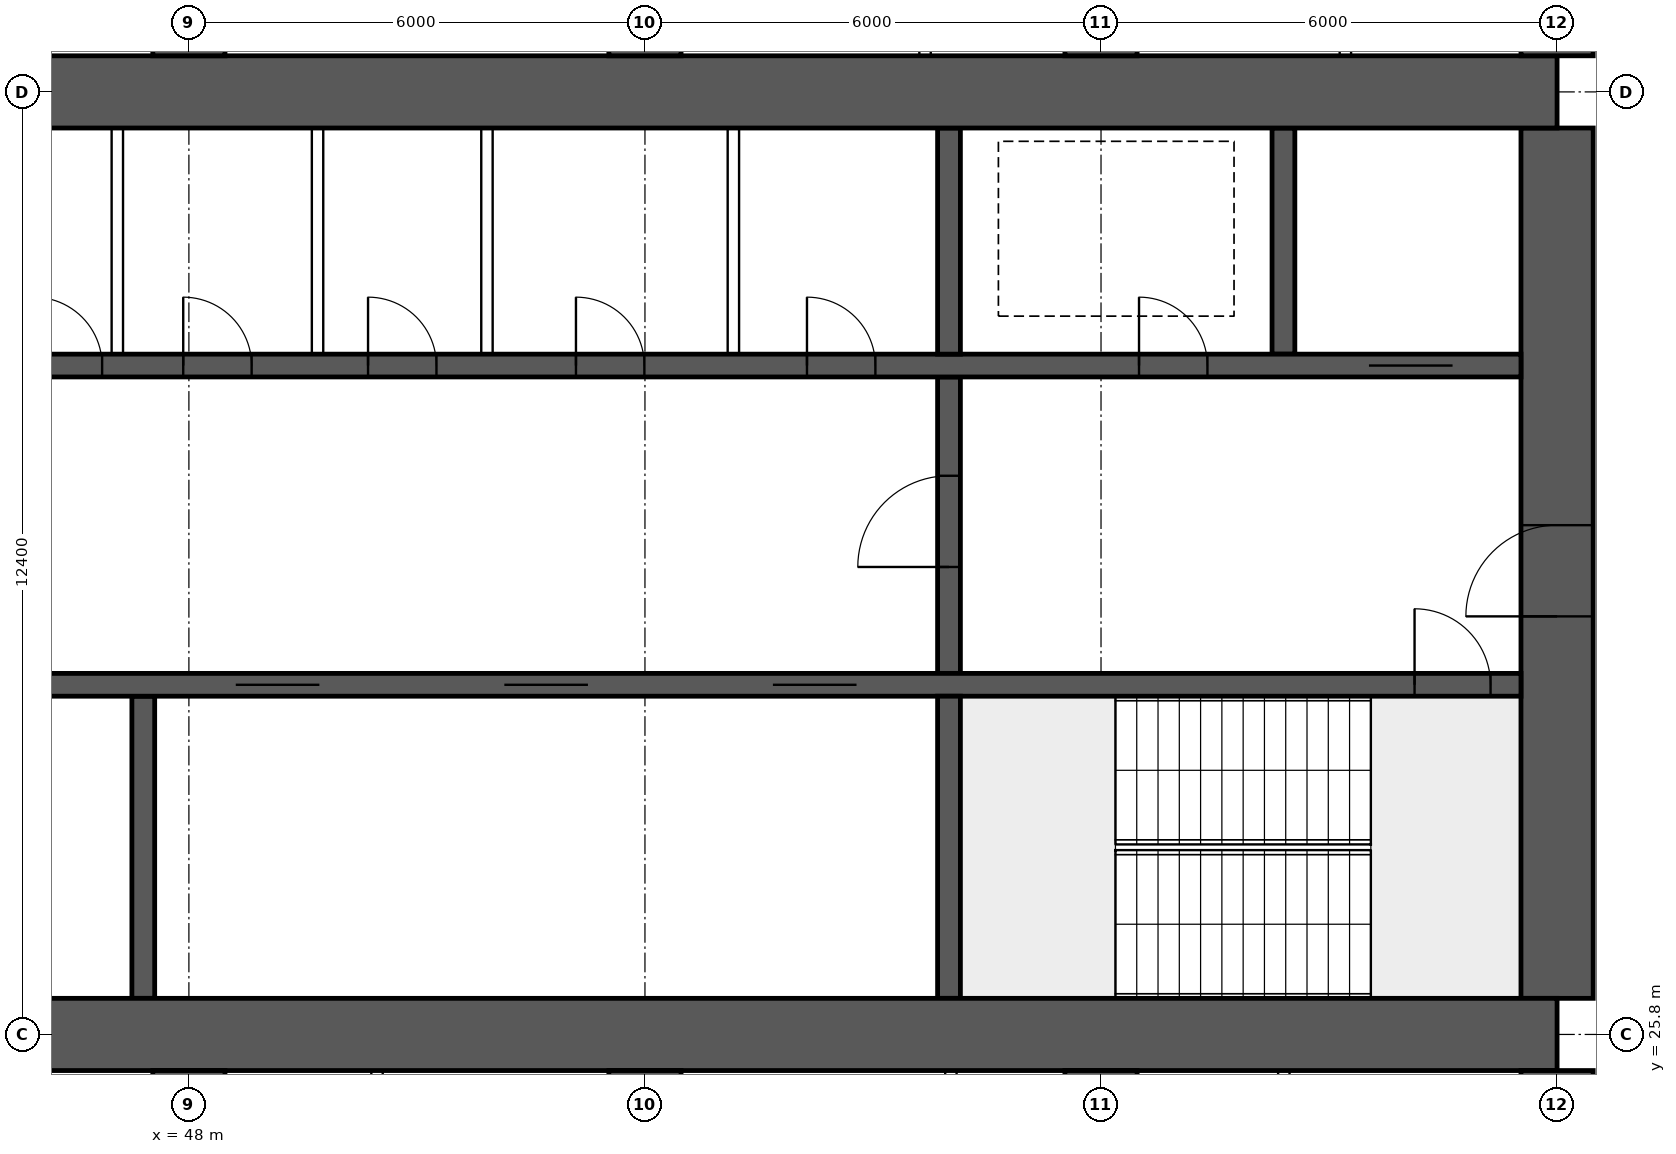
"""IFC4 building model, lengths in metres.
Left out: names, types, materials, properties, quantities, classifications, styles, units other than length and angle.
Written with IfcOpenShell. Run it as: python <this file> out.ifc"""

import sys

from ifc_helpers import new_model, si_unit, direction, frame, frame_2d, origin, place, context, subcontext, project, spatial, rectangle, extrude, element, fill, save


model = new_model("IFC4")
c1 = context("Model", 3, precision=1e-05, world=origin(), true_north=direction((0.0, 1.0)))
c2 = subcontext(c1, "Body", "Model", "MODEL_VIEW")
j1 = project(units=[si_unit("LENGTHUNIT", "METRE"), si_unit("PLANEANGLEUNIT", "RADIAN")], contexts=[c1])
p1 = place(None, origin())
s1 = spatial("IfcSite", under=j1, at=p1, CompositionType="ELEMENT")
p2 = place(p1, origin())
s2 = spatial("IfcBuilding", under=s1, at=p2, CompositionType="ELEMENT")
p3 = place(p2, frame((0.0, 0.0, 76.15)))
s3 = spatial("IfcBuildingStorey", under=s2, at=p3, CompositionType="ELEMENT", Elevation=76.15)
for number, where, z_axis, x_axis in (
    (1, (18.0, 25.8, 0.0), (0.0, 0.0, 1.0), (1.0, 0.0, 0.0)),
    (2, (18.0, 38.2, 0.0), (0.0, 0.0, 1.0), (1.0, 0.0, 0.0)),
):
    element("IfcWall", number, at=place(p3, frame(where, z_axis=z_axis, x_axis=x_axis)), inside=s3, PredefinedType="SHEAR", context=c2, shape_type="SweptSolid", body=[
        extrude(rectangle(XDim=48.0, YDim=0.95, at=frame_2d((24.0, 0.0))), origin(), (0.0, 0.0, 1.0), 4.5),
    ])
p4 = place(p3, frame((66.0, 26.275, 0.0), z_axis=(0.0, 0.0, 1.0), x_axis=(0.0, 1.0, 0.0)))
e3 = element("IfcWall", 3, at=p4, inside=s3, PredefinedType="SHEAR", context=c2, shape_type="SweptSolid", body=[
    extrude(rectangle(XDim=11.45, YDim=0.95, at=frame_2d((5.725, 0.0))), origin(), (0.0, 0.0, 1.0), 4.5),
])
p5 = place(p4, frame((5.025, 0.0, 0.0)))
e4 = element("IfcOpeningElement", 4, at=p5, cuts=e3, PredefinedType="OPENING", context=c2, shape_type="SweptSolid", body=[
    extrude(rectangle(XDim=1.2, YDim=2.1, at=frame_2d((0.6, 1.05))), frame((0.0, 0.485, 0.0), z_axis=(0.0, -1.0, 0.0), x_axis=(1.0, 0.0, 0.0)), (0.0, 0.0, 1.0), 0.97),
])
p6 = place(p3, frame((18.475, 30.4, 0.0), z_axis=(0.0, 0.0, 1.0), x_axis=(1.0, 0.0, 0.0)))
e5 = element("IfcWall", 5, at=p6, inside=s3, PredefinedType="SHEAR", context=c2, shape_type="SweptSolid", body=[
    extrude(rectangle(XDim=47.05, YDim=0.3, at=frame_2d((23.525, 0.0))), origin(), (0.0, 0.0, 1.0), 4.5),
])
p7 = place(p6, frame((0.4, 0.0, 0.0)))
e6 = element("IfcOpeningElement", 6, at=p7, cuts=e5, PredefinedType="OPENING", context=c2, shape_type="SweptSolid", body=[
    extrude(rectangle(XDim=1.0, YDim=2.1, at=frame_2d((0.5, 1.05))), frame((0.0, 0.16, 0.0), z_axis=(0.0, -1.0, 0.0), x_axis=(1.0, 0.0, 0.0)), (0.0, 0.0, 1.0), 0.32),
])
p8 = place(p6, frame((45.65, 0.0, 0.0)))
e7 = element("IfcOpeningElement", 7, at=p8, cuts=e5, PredefinedType="OPENING", context=c2, shape_type="SweptSolid", body=[
    extrude(rectangle(XDim=1.0, YDim=2.1, at=frame_2d((0.5, 1.05))), frame((0.0, 0.16, 0.0), z_axis=(0.0, -1.0, 0.0), x_axis=(1.0, 0.0, 0.0)), (0.0, 0.0, 1.0), 0.32),
])
p9 = place(p6, frame((8.275, 0.0, 0.0)))
e8 = element("IfcOpeningElement", 8, at=p9, cuts=e5, PredefinedType="OPENING", context=c2, shape_type="SweptSolid", body=[
    extrude(rectangle(XDim=1.1, YDim=2.1, at=frame_2d((0.55, 1.05))), frame((0.0, 0.16, 0.0), z_axis=(0.0, -1.0, 0.0), x_axis=(1.0, 0.0, 0.0)), (0.0, 0.0, 1.0), 0.32),
])
p10 = place(p6, frame((10.875, 0.0, 0.0)))
e9 = element("IfcOpeningElement", 9, at=p10, cuts=e5, PredefinedType="OPENING", context=c2, shape_type="SweptSolid", body=[
    extrude(rectangle(XDim=1.1, YDim=2.1, at=frame_2d((0.55, 1.05))), frame((0.0, 0.16, 0.0), z_axis=(0.0, -1.0, 0.0), x_axis=(1.0, 0.0, 0.0)), (0.0, 0.0, 1.0), 0.32),
])
p11 = place(p6, frame((13.475, 0.0, 0.0)))
e10 = element("IfcOpeningElement", 10, at=p11, cuts=e5, PredefinedType="OPENING", context=c2, shape_type="SweptSolid", body=[
    extrude(rectangle(XDim=1.1, YDim=2.1, at=frame_2d((0.55, 1.05))), frame((0.0, 0.16, 0.0), z_axis=(0.0, -1.0, 0.0), x_axis=(1.0, 0.0, 0.0)), (0.0, 0.0, 1.0), 0.32),
])
p12 = place(p6, frame((16.075, 0.0, 0.0)))
e11 = element("IfcOpeningElement", 11, at=p12, cuts=e5, PredefinedType="OPENING", context=c2, shape_type="SweptSolid", body=[
    extrude(rectangle(XDim=1.1, YDim=2.1, at=frame_2d((0.55, 1.05))), frame((0.0, 0.16, 0.0), z_axis=(0.0, -1.0, 0.0), x_axis=(1.0, 0.0, 0.0)), (0.0, 0.0, 1.0), 0.32),
])
p13 = place(p6, frame((18.75, 0.0, 0.0)))
e12 = element("IfcOpeningElement", 12, at=p13, cuts=e5, PredefinedType="OPENING", context=c2, shape_type="SweptSolid", body=[
    extrude(rectangle(XDim=1.1, YDim=2.1, at=frame_2d((0.55, 1.05))), frame((0.0, 0.16, 0.0), z_axis=(0.0, -1.0, 0.0), x_axis=(1.0, 0.0, 0.0)), (0.0, 0.0, 1.0), 0.32),
])
p14 = place(p6, frame((30.142, 0.0, 0.0)))
e13 = element("IfcOpeningElement", 13, at=p14, cuts=e5, PredefinedType="OPENING", context=c2, shape_type="SweptSolid", body=[
    extrude(rectangle(XDim=1.1, YDim=2.1, at=frame_2d((0.55, 1.05))), frame((0.0, 0.16, 0.0), z_axis=(0.0, -1.0, 0.0), x_axis=(1.0, 0.0, 0.0)), (0.0, 0.0, 1.0), 0.32),
])
p15 = place(p6, frame((33.675, 0.0, 0.0)))
e14 = element("IfcOpeningElement", 14, at=p15, cuts=e5, PredefinedType="OPENING", context=c2, shape_type="SweptSolid", body=[
    extrude(rectangle(XDim=1.1, YDim=2.1, at=frame_2d((0.55, 1.05))), frame((0.0, 0.16, 0.0), z_axis=(0.0, -1.0, 0.0), x_axis=(1.0, 0.0, 0.0)), (0.0, 0.0, 1.0), 0.32),
])
p16 = place(p6, frame((37.208, 0.0, 0.0)))
e15 = element("IfcOpeningElement", 15, at=p16, cuts=e5, PredefinedType="OPENING", context=c2, shape_type="SweptSolid", body=[
    extrude(rectangle(XDim=1.1, YDim=2.1, at=frame_2d((0.55, 1.05))), frame((0.0, 0.16, 0.0), z_axis=(0.0, -1.0, 0.0), x_axis=(1.0, 0.0, 0.0)), (0.0, 0.0, 1.0), 0.32),
])
p17 = place(p3, frame((18.475, 34.6, 0.0), z_axis=(0.0, 0.0, 1.0), x_axis=(1.0, 0.0, 0.0)))
e16 = element("IfcWall", 16, at=p17, inside=s3, PredefinedType="SHEAR", context=c2, shape_type="SweptSolid", body=[
    extrude(rectangle(XDim=47.05, YDim=0.3, at=frame_2d((23.525, 0.0))), origin(), (0.0, 0.0, 1.0), 4.5),
])
p18 = place(p17, frame((0.9, 0.0, 0.0)))
e17 = element("IfcOpeningElement", 17, at=p18, cuts=e16, PredefinedType="OPENING", context=c2, shape_type="SweptSolid", body=[
    extrude(rectangle(XDim=1.1, YDim=2.1, at=frame_2d((0.55, 1.05))), frame((0.0, 0.16, 0.0), z_axis=(0.0, -1.0, 0.0), x_axis=(1.0, 0.0, 0.0)), (0.0, 0.0, 1.0), 0.32),
])
p19 = place(p17, frame((45.05, 0.0, 0.0)))
e18 = element("IfcOpeningElement", 18, at=p19, cuts=e16, PredefinedType="OPENING", context=c2, shape_type="SweptSolid", body=[
    extrude(rectangle(XDim=1.1, YDim=2.1, at=frame_2d((0.55, 1.05))), frame((0.0, 0.16, 0.0), z_axis=(0.0, -1.0, 0.0), x_axis=(1.0, 0.0, 0.0)), (0.0, 0.0, 1.0), 0.32),
])
p20 = place(p17, frame((4.125, 0.0, 0.0)))
e19 = element("IfcOpeningElement", 19, at=p20, cuts=e16, PredefinedType="OPENING", context=c2, shape_type="SweptSolid", body=[
    extrude(rectangle(XDim=0.9, YDim=2.1, at=frame_2d((0.45, 1.05))), frame((0.0, 0.16, 0.0), z_axis=(0.0, -1.0, 0.0), x_axis=(1.0, 0.0, 0.0)), (0.0, 0.0, 1.0), 0.32),
])
p21 = place(p17, frame((42.025, 0.0, 0.0)))
e20 = element("IfcOpeningElement", 20, at=p21, cuts=e16, PredefinedType="OPENING", context=c2, shape_type="SweptSolid", body=[
    extrude(rectangle(XDim=0.9, YDim=2.1, at=frame_2d((0.45, 1.05))), frame((0.0, 0.16, 0.0), z_axis=(0.0, -1.0, 0.0), x_axis=(1.0, 0.0, 0.0)), (0.0, 0.0, 1.0), 0.32),
])
p22 = place(p17, frame((8.9, 0.0, 0.0)))
e21 = element("IfcOpeningElement", 21, at=p22, cuts=e16, PredefinedType="OPENING", context=c2, shape_type="SweptSolid", body=[
    extrude(rectangle(XDim=0.9, YDim=2.1, at=frame_2d((0.45, 1.05))), frame((0.0, 0.16, 0.0), z_axis=(0.0, -1.0, 0.0), x_axis=(1.0, 0.0, 0.0)), (0.0, 0.0, 1.0), 0.32),
])
p23 = place(p17, frame((12.874, 0.0, 0.0)))
e22 = element("IfcOpeningElement", 22, at=p23, cuts=e16, PredefinedType="OPENING", context=c2, shape_type="SweptSolid", body=[
    extrude(rectangle(XDim=0.9, YDim=2.1, at=frame_2d((0.45, 1.05))), frame((0.0, 0.16, 0.0), z_axis=(0.0, -1.0, 0.0), x_axis=(1.0, 0.0, 0.0)), (0.0, 0.0, 1.0), 0.32),
])
p24 = place(p17, frame((16.521, 0.0, 0.0)))
e23 = element("IfcOpeningElement", 23, at=p24, cuts=e16, PredefinedType="OPENING", context=c2, shape_type="SweptSolid", body=[
    extrude(rectangle(XDim=0.9, YDim=2.1, at=frame_2d((0.45, 1.05))), frame((0.0, 0.16, 0.0), z_axis=(0.0, -1.0, 0.0), x_axis=(1.0, 0.0, 0.0)), (0.0, 0.0, 1.0), 0.32),
])
p25 = place(p17, frame((20.28, 0.0, 0.0)))
e24 = element("IfcOpeningElement", 24, at=p25, cuts=e16, PredefinedType="OPENING", context=c2, shape_type="SweptSolid", body=[
    extrude(rectangle(XDim=0.9, YDim=2.1, at=frame_2d((0.45, 1.05))), frame((0.0, 0.16, 0.0), z_axis=(0.0, -1.0, 0.0), x_axis=(1.0, 0.0, 0.0)), (0.0, 0.0, 1.0), 0.32),
])
p26 = place(p17, frame((24.686, 0.0, 0.0)))
e25 = element("IfcOpeningElement", 25, at=p26, cuts=e16, PredefinedType="OPENING", context=c2, shape_type="SweptSolid", body=[
    extrude(rectangle(XDim=0.9, YDim=2.1, at=frame_2d((0.45, 1.05))), frame((0.0, 0.16, 0.0), z_axis=(0.0, -1.0, 0.0), x_axis=(1.0, 0.0, 0.0)), (0.0, 0.0, 1.0), 0.32),
])
p27 = place(p17, frame((27.483, 0.0, 0.0)))
e26 = element("IfcOpeningElement", 26, at=p27, cuts=e16, PredefinedType="OPENING", context=c2, shape_type="SweptSolid", body=[
    extrude(rectangle(XDim=0.9, YDim=2.1, at=frame_2d((0.45, 1.05))), frame((0.0, 0.16, 0.0), z_axis=(0.0, -1.0, 0.0), x_axis=(1.0, 0.0, 0.0)), (0.0, 0.0, 1.0), 0.32),
])
p28 = place(p17, frame((29.45, 0.0, 0.0)))
e27 = element("IfcOpeningElement", 27, at=p28, cuts=e16, PredefinedType="OPENING", context=c2, shape_type="SweptSolid", body=[
    extrude(rectangle(XDim=0.9, YDim=2.1, at=frame_2d((0.45, 1.05))), frame((0.0, 0.16, 0.0), z_axis=(0.0, -1.0, 0.0), x_axis=(1.0, 0.0, 0.0)), (0.0, 0.0, 1.0), 0.32),
])
p29 = place(p17, frame((31.882, 0.0, 0.0)))
e28 = element("IfcOpeningElement", 28, at=p29, cuts=e16, PredefinedType="OPENING", context=c2, shape_type="SweptSolid", body=[
    extrude(rectangle(XDim=0.9, YDim=2.1, at=frame_2d((0.45, 1.05))), frame((0.0, 0.16, 0.0), z_axis=(0.0, -1.0, 0.0), x_axis=(1.0, 0.0, 0.0)), (0.0, 0.0, 1.0), 0.32),
])
p30 = place(p17, frame((34.617, 0.0, 0.0)))
e29 = element("IfcOpeningElement", 29, at=p30, cuts=e16, PredefinedType="OPENING", context=c2, shape_type="SweptSolid", body=[
    extrude(rectangle(XDim=0.9, YDim=2.1, at=frame_2d((0.45, 1.05))), frame((0.0, 0.16, 0.0), z_axis=(0.0, -1.0, 0.0), x_axis=(1.0, 0.0, 0.0)), (0.0, 0.0, 1.0), 0.32),
])
p31 = place(p17, frame((37.656, 0.0, 0.0)))
e30 = element("IfcOpeningElement", 30, at=p31, cuts=e16, PredefinedType="OPENING", context=c2, shape_type="SweptSolid", body=[
    extrude(rectangle(XDim=0.9, YDim=2.1, at=frame_2d((0.45, 1.05))), frame((0.0, 0.16, 0.0), z_axis=(0.0, -1.0, 0.0), x_axis=(1.0, 0.0, 0.0)), (0.0, 0.0, 1.0), 0.32),
])
p32 = place(p3, frame((58.0, 26.275, 0.0), z_axis=(0.0, 0.0, 1.0), x_axis=(0.0, 1.0, 0.0)))
e31 = element("IfcWall", 31, at=p32, inside=s3, PredefinedType="SHEAR", context=c2, shape_type="SweptSolid", body=[
    extrude(rectangle(XDim=3.975, YDim=0.3, at=frame_2d((1.988, 0.0))), origin(), (0.0, 0.0, 1.0), 4.5),
])
p33 = place(p3, frame((58.0, 30.55, 0.0), z_axis=(0.0, 0.0, 1.0), x_axis=(0.0, 1.0, 0.0)))
e32 = element("IfcWall", 32, at=p33, inside=s3, PredefinedType="SHEAR", context=c2, shape_type="SweptSolid", body=[
    extrude(rectangle(XDim=3.9, YDim=0.3, at=frame_2d((1.95, 0.0))), origin(), (0.0, 0.0, 1.0), 4.5),
])
p34 = place(p33, frame((1.4, 0.0, 0.0)))
e33 = element("IfcOpeningElement", 33, at=p34, cuts=e32, PredefinedType="OPENING", context=c2, shape_type="SweptSolid", body=[
    extrude(rectangle(XDim=1.2, YDim=2.1, at=frame_2d((0.6, 1.05))), frame((0.0, 0.16, 0.0), z_axis=(0.0, -1.0, 0.0), x_axis=(1.0, 0.0, 0.0)), (0.0, 0.0, 1.0), 0.32),
])
for number, where, z_axis, x_axis in (
    (34, (62.4, 34.75, 0.0), (0.0, 0.0, 1.0), (0.0, 1.0, 0.0)),
    (35, (58.0, 34.75, 0.0), (0.0, 0.0, 1.0), (0.0, 1.0, 0.0)),
):
    element("IfcWall", number, at=place(p3, frame(where, z_axis=z_axis, x_axis=x_axis)), inside=s3, PredefinedType="SHEAR", context=c2, shape_type="SweptSolid", body=[
        extrude(rectangle(XDim=2.975, YDim=0.3, at=frame_2d((1.488, 0.0))), origin(), (0.0, 0.0, 1.0), 4.5),
    ])
p35 = place(p3, frame((47.4, 26.275, 0.0), z_axis=(0.0, 0.0, 1.0), x_axis=(0.0, 1.0, 0.0)))
e36 = element("IfcWall", 36, at=p35, inside=s3, PredefinedType="SHEAR", context=c2, shape_type="SweptSolid", body=[
    extrude(rectangle(XDim=3.975, YDim=0.3, at=frame_2d((1.988, 0.0))), origin(), (0.0, 0.0, 1.0), 4.5),
])
for number, where, z_axis, x_axis in (
    (37, (48.0, 16.0, 0.0), (0.0, 0.0, 1.0), (0.0, 1.0, 0.0)),
    (38, (48.0, 38.675, 0.0), (0.0, 0.0, 1.0), (0.0, 1.0, 0.0)),
    (39, (54.0, 16.0, 0.0), (0.0, 0.0, 1.0), (0.0, 1.0, 0.0)),
    (40, (54.0, 38.675, 0.0), (0.0, 0.0, 1.0), (0.0, 1.0, 0.0)),
    (41, (60.0, 16.0, 0.0), (0.0, 0.0, 1.0), (0.0, 1.0, 0.0)),
    (42, (60.0, 38.675, 0.0), (0.0, 0.0, 1.0), (0.0, 1.0, 0.0)),
    (43, (66.0, 16.0, 0.0), (0.0, 0.0, 1.0), (0.0, 1.0, 0.0)),
    (44, (66.0, 38.675, 0.0), (0.0, 0.0, 1.0), (0.0, 1.0, 0.0)),
):
    element("IfcWall", number, at=place(p3, frame(where, z_axis=z_axis, x_axis=x_axis)), inside=s3, PredefinedType="SHEAR", context=c2, shape_type="SweptSolid", body=[
        extrude(rectangle(XDim=9.325, YDim=0.95, at=frame_2d((4.663, 0.0))), origin(), (0.0, 0.0, 1.0), 4.5),
    ])
for number, where, z_axis, x_axis in (
    (45, (47.058, 34.75, 0.0), (0.0, 0.0, 1.0), (0.0, 1.0, 0.0)),
    (46, (49.692, 34.75, 0.0), (0.0, 0.0, 1.0), (0.0, 1.0, 0.0)),
    (47, (51.921, 34.75, 0.0), (0.0, 0.0, 1.0), (0.0, 1.0, 0.0)),
    (48, (55.163, 34.75, 0.0), (0.0, 0.0, 1.0), (0.0, 1.0, 0.0)),
):
    element("IfcWall", number, at=place(p3, frame(where, z_axis=z_axis, x_axis=x_axis)), inside=s3, PredefinedType="SOLIDWALL", context=c2, shape_type="SweptSolid", body=[
        extrude(rectangle(XDim=2.975, YDim=0.15, at=frame_2d((1.488, 0.0))), origin(), (0.0, 0.0, 1.0), 4.25),
    ])
for number, where, z_axis, x_axis in (
    (49, (50.475, 16.1, 0.0), (0.0, 0.0, 1.0), (0.0, 1.0, 0.0)),
    (50, (58.025, 16.1, 0.0), (0.0, 0.0, 1.0), (0.0, 1.0, 0.0)),
    (51, (62.405, 16.1, 0.0), (0.0, 0.0, 1.0), (0.0, 1.0, 0.0)),
    (52, (57.685, 38.675, 0.0), (0.0, 0.0, 1.0), (0.0, 1.0, 0.0)),
    (53, (63.215, 38.675, 0.0), (0.0, 0.0, 1.0), (0.0, 1.0, 0.0)),
):
    element("IfcWall", number, at=place(p3, frame(where, z_axis=z_axis, x_axis=x_axis)), inside=s3, PredefinedType="PARTITIONING", context=c2, shape_type="SweptSolid", body=[
        extrude(rectangle(XDim=9.225, YDim=0.15, at=frame_2d((4.612, 0.0))), origin(), (0.0, 0.0, 1.0), 4.25),
    ])
p36 = place(p5, origin())
e54 = element("IfcDoor", 54, at=p36, inside=s3, OperationType="SINGLE_SWING_LEFT", PredefinedType="DOOR", context=c2, shape_type="SweptSolid", body=[
    extrude(rectangle(XDim=1.2, YDim=2.1, at=frame_2d((0.6, 1.05))), frame((0.0, 0.025, 0.0), z_axis=(0.0, -1.0, 0.0), x_axis=(1.0, 0.0, 0.0)), (0.0, 0.0, 1.0), 0.05),
])
fill(e4, e54)
p37 = place(p8, origin())
e55 = element("IfcDoor", 55, at=p37, inside=s3, OperationType="SINGLE_SWING_LEFT", PredefinedType="DOOR", context=c2, shape_type="SweptSolid", body=[
    extrude(rectangle(XDim=1.0, YDim=2.1, at=frame_2d((0.5, 1.05))), frame((0.0, 0.025, 0.0), z_axis=(0.0, -1.0, 0.0), x_axis=(1.0, 0.0, 0.0)), (0.0, 0.0, 1.0), 0.05),
])
fill(e7, e55)
p38 = place(p19, origin())
e56 = element("IfcDoor", 56, at=p38, inside=s3, OperationType="DOUBLE_DOOR_SLIDING", PredefinedType="DOOR", context=c2, shape_type="SweptSolid", body=[
    extrude(rectangle(XDim=1.1, YDim=2.1, at=frame_2d((0.55, 1.05))), frame((0.0, 0.025, 0.0), z_axis=(0.0, -1.0, 0.0), x_axis=(1.0, 0.0, 0.0)), (0.0, 0.0, 1.0), 0.05),
])
fill(e18, e56)
p39 = place(p21, origin())
e57 = element("IfcDoor", 57, at=p39, inside=s3, OperationType="SINGLE_SWING_LEFT", PredefinedType="DOOR", context=c2, shape_type="SweptSolid", body=[
    extrude(rectangle(XDim=0.9, YDim=2.1, at=frame_2d((0.45, 1.05))), frame((0.0, 0.025, 0.0), z_axis=(0.0, -1.0, 0.0), x_axis=(1.0, 0.0, 0.0)), (0.0, 0.0, 1.0), 0.05),
])
fill(e20, e57)
p40 = place(p34, origin())
e58 = element("IfcDoor", 58, at=p40, inside=s3, OperationType="SINGLE_SWING_LEFT", PredefinedType="DOOR", context=c2, shape_type="SweptSolid", body=[
    extrude(rectangle(XDim=1.2, YDim=2.1, at=frame_2d((0.6, 1.05))), frame((0.0, 0.025, 0.0), z_axis=(0.0, -1.0, 0.0), x_axis=(1.0, 0.0, 0.0)), (0.0, 0.0, 1.0), 0.05),
])
fill(e33, e58)
p41 = place(p27, origin())
e59 = element("IfcDoor", 59, at=p41, inside=s3, OperationType="SINGLE_SWING_LEFT", PredefinedType="DOOR", context=c2, shape_type="SweptSolid", body=[
    extrude(rectangle(XDim=0.9, YDim=2.1, at=frame_2d((0.45, 1.05))), frame((0.0, 0.025, 0.0), z_axis=(0.0, -1.0, 0.0), x_axis=(1.0, 0.0, 0.0)), (0.0, 0.0, 1.0), 0.05),
])
fill(e26, e59)
p42 = place(p28, origin())
e60 = element("IfcDoor", 60, at=p42, inside=s3, OperationType="SINGLE_SWING_LEFT", PredefinedType="DOOR", context=c2, shape_type="SweptSolid", body=[
    extrude(rectangle(XDim=0.9, YDim=2.1, at=frame_2d((0.45, 1.05))), frame((0.0, 0.025, 0.0), z_axis=(0.0, -1.0, 0.0), x_axis=(1.0, 0.0, 0.0)), (0.0, 0.0, 1.0), 0.05),
])
fill(e27, e60)
p43 = place(p29, origin())
e61 = element("IfcDoor", 61, at=p43, inside=s3, OperationType="SINGLE_SWING_LEFT", PredefinedType="DOOR", context=c2, shape_type="SweptSolid", body=[
    extrude(rectangle(XDim=0.9, YDim=2.1, at=frame_2d((0.45, 1.05))), frame((0.0, 0.025, 0.0), z_axis=(0.0, -1.0, 0.0), x_axis=(1.0, 0.0, 0.0)), (0.0, 0.0, 1.0), 0.05),
])
fill(e28, e61)
p44 = place(p30, origin())
e62 = element("IfcDoor", 62, at=p44, inside=s3, OperationType="SINGLE_SWING_LEFT", PredefinedType="DOOR", context=c2, shape_type="SweptSolid", body=[
    extrude(rectangle(XDim=0.9, YDim=2.1, at=frame_2d((0.45, 1.05))), frame((0.0, 0.025, 0.0), z_axis=(0.0, -1.0, 0.0), x_axis=(1.0, 0.0, 0.0)), (0.0, 0.0, 1.0), 0.05),
])
fill(e29, e62)
p45 = place(p31, origin())
e63 = element("IfcDoor", 63, at=p45, inside=s3, OperationType="SINGLE_SWING_LEFT", PredefinedType="DOOR", context=c2, shape_type="SweptSolid", body=[
    extrude(rectangle(XDim=0.9, YDim=2.1, at=frame_2d((0.45, 1.05))), frame((0.0, 0.025, 0.0), z_axis=(0.0, -1.0, 0.0), x_axis=(1.0, 0.0, 0.0)), (0.0, 0.0, 1.0), 0.05),
])
fill(e30, e63)
p46 = place(p14, origin())
e64 = element("IfcDoor", 64, at=p46, inside=s3, OperationType="DOUBLE_DOOR_SLIDING", PredefinedType="DOOR", context=c2, shape_type="SweptSolid", body=[
    extrude(rectangle(XDim=1.1, YDim=2.1, at=frame_2d((0.55, 1.05))), frame((0.0, 0.025, 0.0), z_axis=(0.0, -1.0, 0.0), x_axis=(1.0, 0.0, 0.0)), (0.0, 0.0, 1.0), 0.05),
])
fill(e13, e64)
p47 = place(p15, origin())
e65 = element("IfcDoor", 65, at=p47, inside=s3, OperationType="DOUBLE_DOOR_SLIDING", PredefinedType="DOOR", context=c2, shape_type="SweptSolid", body=[
    extrude(rectangle(XDim=1.1, YDim=2.1, at=frame_2d((0.55, 1.05))), frame((0.0, 0.025, 0.0), z_axis=(0.0, -1.0, 0.0), x_axis=(1.0, 0.0, 0.0)), (0.0, 0.0, 1.0), 0.05),
])
fill(e14, e65)
p48 = place(p16, origin())
e66 = element("IfcDoor", 66, at=p48, inside=s3, OperationType="DOUBLE_DOOR_SLIDING", PredefinedType="DOOR", context=c2, shape_type="SweptSolid", body=[
    extrude(rectangle(XDim=1.1, YDim=2.1, at=frame_2d((0.55, 1.05))), frame((0.0, 0.025, 0.0), z_axis=(0.0, -1.0, 0.0), x_axis=(1.0, 0.0, 0.0)), (0.0, 0.0, 1.0), 0.05),
])
fill(e15, e66)
save(model, sys.argv[1])
